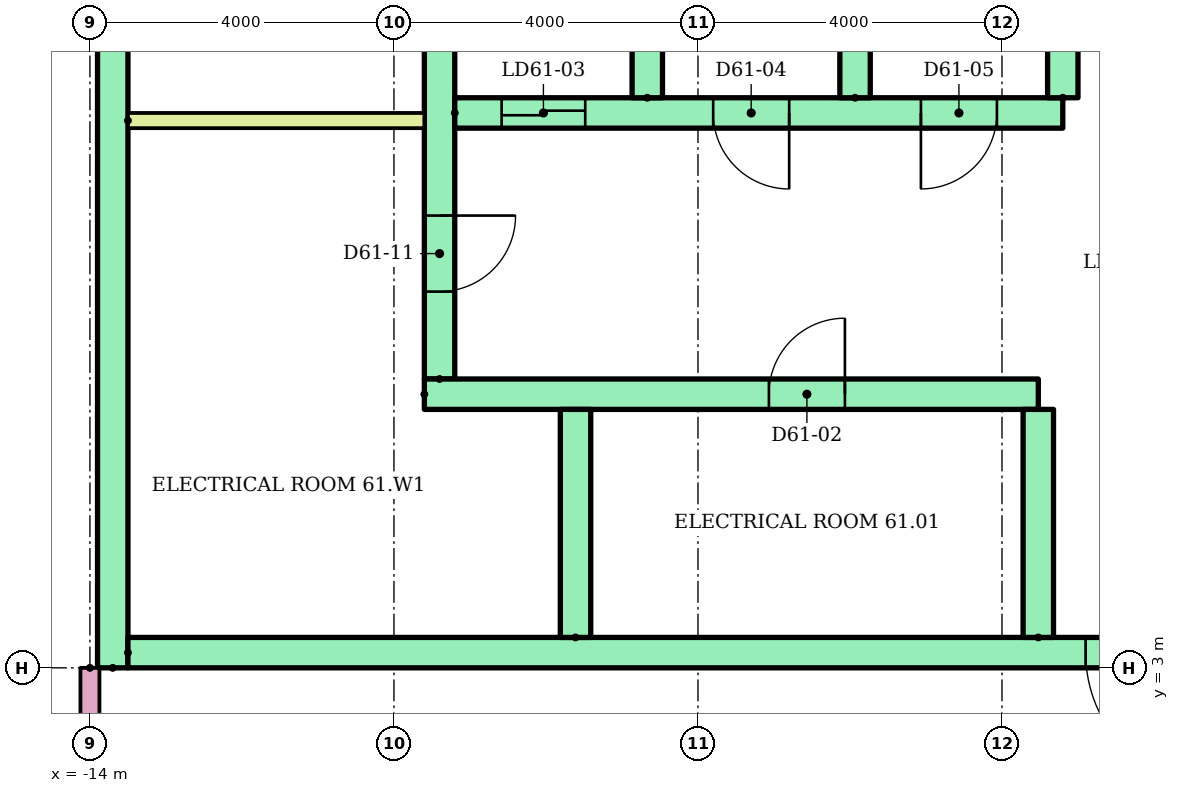
"""IFC4 building model, lengths in metres.
Left out: names, types, materials, properties, quantities, classifications, styles, units other than length and angle.
Written with IfcOpenShell. Run it as: python <this file> out.ifc"""

import sys

from ifc_helpers import new_model, si_unit, direction, frame, frame_2d, origin, place, context, subcontext, project, spatial, rectangle, extrude, element, fill, save


model = new_model("IFC4")
c1 = context("Model", 3, precision=1e-05, world=origin(), true_north=direction((0.0, 1.0)))
c2 = subcontext(c1, "Body", "Model", "MODEL_VIEW")
j1 = project(units=[si_unit("LENGTHUNIT", "METRE"), si_unit("PLANEANGLEUNIT", "RADIAN")], contexts=[c1])
p1 = place(None, origin())
s1 = spatial("IfcSite", under=j1, at=p1, CompositionType="ELEMENT")
p2 = place(p1, origin())
s2 = spatial("IfcBuilding", under=s1, at=p2, CompositionType="ELEMENT")
p3 = place(p2, frame((0.0, 0.0, 233.2)))
s3 = spatial("IfcBuildingStorey", under=s2, at=p3, CompositionType="ELEMENT", Elevation=233.2)
p4 = place(p3, frame((-13.7, 3.0, 0.0), z_axis=(0.0, 0.0, 1.0), x_axis=(0.0, 1.0, 0.0)))
e1 = element("IfcWall", 1, at=p4, inside=s3, PredefinedType="SHEAR", context=c2, shape_type="SweptSolid", body=[
    extrude(rectangle(XDim=17.0, YDim=0.4, at=frame_2d((8.5, 0.0))), origin(), (0.0, 0.0, 1.0), 2.92),
])
p5 = place(p3, frame((-9.4, 6.8, 0.0), z_axis=(0.0, 0.0, 1.0), x_axis=(0.0, 1.0, 0.0)))
e2 = element("IfcWall", 2, at=p5, inside=s3, PredefinedType="SHEAR", context=c2, shape_type="SweptSolid", body=[
    extrude(rectangle(XDim=12.7, YDim=0.4, at=frame_2d((6.35, 0.0))), origin(), (0.0, 0.0, 1.0), 2.92),
])
p6 = place(p5, frame((1.15, 0.0, 0.0)))
e3 = element("IfcOpeningElement", 3, at=p6, cuts=e2, PredefinedType="OPENING", context=c2, shape_type="SweptSolid", body=[
    extrude(rectangle(XDim=1.0, YDim=2.1, at=frame_2d((0.5, 1.05))), frame((0.0, 0.21, 0.0), z_axis=(0.0, -1.0, 0.0), x_axis=(1.0, 0.0, 0.0)), (0.0, 0.0, 1.0), 0.42),
])
p7 = place(p5, frame((7.925, 0.0, 0.0)))
e4 = element("IfcOpeningElement", 4, at=p7, cuts=e2, PredefinedType="OPENING", context=c2, shape_type="SweptSolid", body=[
    extrude(rectangle(XDim=1.0, YDim=2.1, at=frame_2d((0.5, 1.05))), frame((0.0, 0.21, 0.0), z_axis=(0.0, -1.0, 0.0), x_axis=(1.0, 0.0, 0.0)), (0.0, 0.0, 1.0), 0.42),
])
p8 = place(p3, frame((-13.5, 3.2, 0.0)))
e5 = element("IfcWall", 5, at=p8, inside=s3, PredefinedType="SHEAR", context=c2, shape_type="SweptSolid", body=[
    extrude(rectangle(XDim=27.0, YDim=0.4, at=frame_2d((13.5, 0.0))), origin(), (0.0, 0.0, 1.0), 2.92),
])
p9 = place(p8, frame((22.083, 0.0, 0.0)))
e6 = element("IfcOpeningElement", 6, at=p9, cuts=e5, PredefinedType="OPENING", context=c2, shape_type="SweptSolid", body=[
    extrude(rectangle(XDim=1.1, YDim=2.1, at=frame_2d((0.55, 1.05))), frame((0.0, 0.21, 0.0), z_axis=(0.0, -1.0, 0.0), x_axis=(1.0, 0.0, 0.0)), (0.0, 0.0, 1.0), 0.42),
])
p10 = place(p8, frame((25.128, 0.0, 0.0)))
e7 = element("IfcOpeningElement", 7, at=p10, cuts=e5, PredefinedType="OPENING", context=c2, shape_type="SweptSolid", body=[
    extrude(rectangle(XDim=1.1, YDim=2.1, at=frame_2d((0.55, 1.05))), frame((0.0, 0.21, 0.0), z_axis=(0.0, -1.0, 0.0), x_axis=(1.0, 0.0, 0.0)), (0.0, 0.0, 1.0), 0.42),
])
p11 = place(p8, frame((12.6, 0.0, 0.0)))
e8 = element("IfcOpeningElement", 8, at=p11, cuts=e5, PredefinedType="OPENING", context=c2, shape_type="SweptSolid", body=[
    extrude(rectangle(XDim=1.8, YDim=2.1, at=frame_2d((0.9, 1.05))), frame((0.0, 0.21, 0.0), z_axis=(0.0, -1.0, 0.0), x_axis=(1.0, 0.0, 0.0)), (0.0, 0.0, 1.0), 0.42),
])
p12 = place(p3, frame((-9.6, 6.6, 0.0)))
e9 = element("IfcWall", 9, at=p12, inside=s3, PredefinedType="SHEAR", context=c2, shape_type="SweptSolid", body=[
    extrude(rectangle(XDim=8.078, YDim=0.4, at=frame_2d((4.039, 0.0))), origin(), (0.0, 0.0, 1.0), 2.92),
])
p13 = place(p12, frame((4.533, 0.0, 0.0)))
e10 = element("IfcOpeningElement", 10, at=p13, cuts=e9, PredefinedType="OPENING", context=c2, shape_type="SweptSolid", body=[
    extrude(rectangle(XDim=1.0, YDim=2.1, at=frame_2d((0.5, 1.05))), frame((0.0, 0.21, 0.0), z_axis=(0.0, -1.0, 0.0), x_axis=(1.0, 0.0, 0.0)), (0.0, 0.0, 1.0), 0.42),
])
for number, where, z_axis, x_axis in (
    (11, (-7.611, 3.4, 0.0), (0.0, 0.0, 1.0), (0.0, 1.0, 0.0)),
    (12, (-1.522, 3.4, 0.0), (0.0, 0.0, 1.0), (0.0, 1.0, 0.0)),
):
    element("IfcWall", number, at=place(p3, frame(where, z_axis=z_axis, x_axis=x_axis)), inside=s3, PredefinedType="SHEAR", context=c2, shape_type="SweptSolid", body=[
        extrude(rectangle(XDim=3.0, YDim=0.4, at=frame_2d((1.5, 0.0))), origin(), (0.0, 0.0, 1.0), 2.92),
    ])
p14 = place(p3, frame((-9.2, 10.3, 0.0)))
e13 = element("IfcWall", 13, at=p14, inside=s3, PredefinedType="SHEAR", context=c2, shape_type="SweptSolid", body=[
    extrude(rectangle(XDim=8.0, YDim=0.4, at=frame_2d((4.0, 0.0))), origin(), (0.0, 0.0, 1.0), 2.92),
])
p15 = place(p14, frame((0.617, 0.0, 0.0)))
e14 = element("IfcOpeningElement", 14, at=p15, cuts=e13, PredefinedType="OPENING", context=c2, shape_type="SweptSolid", body=[
    extrude(rectangle(XDim=1.1, YDim=2.1, at=frame_2d((0.55, 1.05))), frame((0.0, 0.21, 0.0), z_axis=(0.0, -1.0, 0.0), x_axis=(1.0, 0.0, 0.0)), (0.0, 0.0, 1.0), 0.42),
])
p16 = place(p14, frame((3.4, 0.0, 0.0)))
e15 = element("IfcOpeningElement", 15, at=p16, cuts=e13, PredefinedType="OPENING", context=c2, shape_type="SweptSolid", body=[
    extrude(rectangle(XDim=1.0, YDim=2.1, at=frame_2d((0.5, 1.05))), frame((0.0, 0.21, 0.0), z_axis=(0.0, -1.0, 0.0), x_axis=(1.0, 0.0, 0.0)), (0.0, 0.0, 1.0), 0.42),
])
p17 = place(p14, frame((6.133, 0.0, 0.0)))
e16 = element("IfcOpeningElement", 16, at=p17, cuts=e13, PredefinedType="OPENING", context=c2, shape_type="SweptSolid", body=[
    extrude(rectangle(XDim=1.0, YDim=2.1, at=frame_2d((0.5, 1.05))), frame((0.0, 0.21, 0.0), z_axis=(0.0, -1.0, 0.0), x_axis=(1.0, 0.0, 0.0)), (0.0, 0.0, 1.0), 0.42),
])
for number, where, z_axis, x_axis in (
    (17, (-6.667, 10.5, 0.0), (0.0, 0.0, 1.0), (0.0, 1.0, 0.0)),
    (18, (-3.933, 10.5, 0.0), (0.0, 0.0, 1.0), (0.0, 1.0, 0.0)),
    (19, (-1.2, 10.5, 0.0), (0.0, 0.0, 1.0), (0.0, 1.0, 0.0)),
):
    element("IfcWall", number, at=place(p3, frame(where, z_axis=z_axis, x_axis=x_axis)), inside=s3, PredefinedType="SHEAR", context=c2, shape_type="SweptSolid", body=[
        extrude(rectangle(XDim=3.0, YDim=0.4, at=frame_2d((1.5, 0.0))), origin(), (0.0, 0.0, 1.0), 2.92),
    ])
p18 = place(p3, frame((-13.5, 10.2, 0.0)))
e20 = element("IfcWall", 20, at=p18, inside=s3, PredefinedType="PARTITIONING", context=c2, shape_type="SweptSolid", body=[
    extrude(rectangle(XDim=3.9, YDim=0.2, at=frame_2d((1.95, 0.0))), origin(), (0.0, 0.0, 1.0), 2.92),
])
p19 = place(p3, frame((-14.0, 3.0, 0.0), z_axis=(0.0, 0.0, 1.0), x_axis=(0.0, -1.0, 0.0)))
e21 = element("IfcWall", 21, at=p19, inside=s3, PredefinedType="PARTITIONING", context=c2, shape_type="SweptSolid", body=[
    extrude(rectangle(XDim=1.6, YDim=0.25, at=frame_2d((0.8, 0.0))), origin(), (0.0, 0.0, 1.0), 2.4),
])
p20 = place(p11, frame((1.8, 0.0, 0.0), z_axis=(0.0, 0.0, 1.0), x_axis=(-1.0, 0.0, 0.0)))
e22 = element("IfcDoor", 22, at=p20, inside=s3, OperationType="DOUBLE_DOOR_SINGLE_SWING", PredefinedType="DOOR", context=c2, shape_type="SweptSolid", body=[
    extrude(rectangle(XDim=1.8, YDim=2.1, at=frame_2d((0.9, 1.05))), frame((0.0, 0.025, 0.0), z_axis=(0.0, -1.0, 0.0), x_axis=(1.0, 0.0, 0.0)), (0.0, 0.0, 1.0), 0.05),
])
fill(e8, e22)
p21 = place(p13, origin())
e23 = element("IfcDoor", 23, at=p21, inside=s3, OperationType="SINGLE_SWING_RIGHT", PredefinedType="DOOR", context=c2, shape_type="SweptSolid", body=[
    extrude(rectangle(XDim=1.0, YDim=2.1, at=frame_2d((0.5, 1.05))), frame((0.0, 0.025, 0.0), z_axis=(0.0, -1.0, 0.0), x_axis=(1.0, 0.0, 0.0)), (0.0, 0.0, 1.0), 0.05),
])
fill(e10, e23)
p22 = place(p15, origin())
e24 = element("IfcDoor", 24, at=p22, inside=s3, OperationType="SLIDING_TO_LEFT", PredefinedType="DOOR", context=c2, shape_type="SweptSolid", body=[
    extrude(rectangle(XDim=1.1, YDim=2.1, at=frame_2d((0.55, 1.05))), frame((0.0, 0.025, 0.0), z_axis=(0.0, -1.0, 0.0), x_axis=(1.0, 0.0, 0.0)), (0.0, 0.0, 1.0), 0.05),
])
fill(e14, e24)
p23 = place(p16, frame((1.0, 0.0, 0.0), z_axis=(0.0, 0.0, 1.0), x_axis=(-1.0, 0.0, 0.0)))
e25 = element("IfcDoor", 25, at=p23, inside=s3, OperationType="SINGLE_SWING_RIGHT", PredefinedType="DOOR", context=c2, shape_type="SweptSolid", body=[
    extrude(rectangle(XDim=1.0, YDim=2.1, at=frame_2d((0.5, 1.05))), frame((0.0, 0.025, 0.0), z_axis=(0.0, -1.0, 0.0), x_axis=(1.0, 0.0, 0.0)), (0.0, 0.0, 1.0), 0.05),
])
fill(e15, e25)
p24 = place(p17, frame((1.0, 0.0, 0.0), z_axis=(0.0, 0.0, 1.0), x_axis=(-1.0, 0.0, 0.0)))
e26 = element("IfcDoor", 26, at=p24, inside=s3, OperationType="SINGLE_SWING_LEFT", PredefinedType="DOOR", context=c2, shape_type="SweptSolid", body=[
    extrude(rectangle(XDim=1.0, YDim=2.1, at=frame_2d((0.5, 1.05))), frame((0.0, 0.025, 0.0), z_axis=(0.0, -1.0, 0.0), x_axis=(1.0, 0.0, 0.0)), (0.0, 0.0, 1.0), 0.05),
])
fill(e16, e26)
p25 = place(p6, frame((1.0, 0.0, 0.0), z_axis=(0.0, 0.0, 1.0), x_axis=(-1.0, 0.0, 0.0)))
e27 = element("IfcDoor", 27, at=p25, inside=s3, OperationType="SINGLE_SWING_RIGHT", PredefinedType="DOOR", context=c2, shape_type="SweptSolid", body=[
    extrude(rectangle(XDim=1.0, YDim=2.1, at=frame_2d((0.5, 1.05))), frame((0.0, 0.025, 0.0), z_axis=(0.0, -1.0, 0.0), x_axis=(1.0, 0.0, 0.0)), (0.0, 0.0, 1.0), 0.05),
])
fill(e3, e27)
save(model, sys.argv[1])
